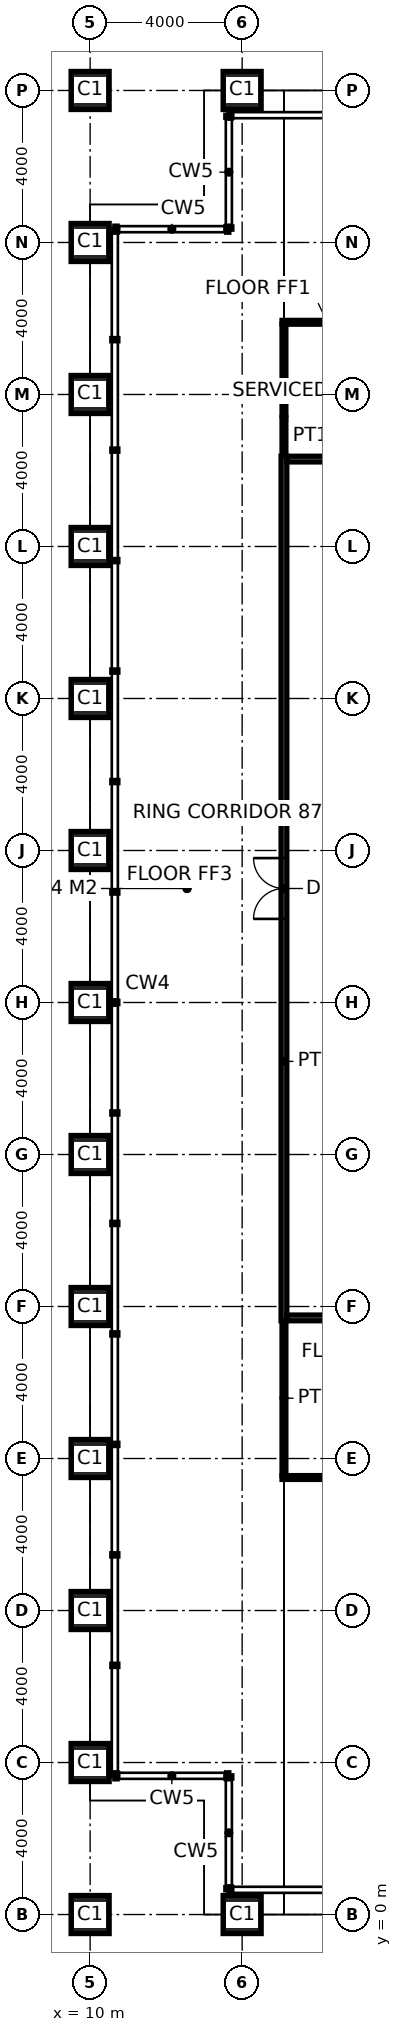
"""IFC4 building model, lengths in metres.
Left out: names, types, materials, properties, quantities, classifications, styles, units other than length and angle.
Written with IfcOpenShell. Run it as: python <this file> out.ifc"""

import sys

from ifc_helpers import new_model, si_unit, direction, frame, frame_2d, origin, origin_2d, place, context, subcontext, project, spatial, rectangle, hollow_rectangle, extrude, element, fill, save


model = new_model("IFC4")
c1 = context("Model", 3, precision=1e-05, world=origin(), true_north=direction((0.0, 1.0)))
c2 = subcontext(c1, "Body", "Model", "MODEL_VIEW")
j1 = project(units=[si_unit("LENGTHUNIT", "METRE"), si_unit("PLANEANGLEUNIT", "RADIAN")], contexts=[c1])
p1 = place(None, origin())
s1 = spatial("IfcSite", under=j1, at=p1, CompositionType="ELEMENT")
p2 = place(p1, origin())
s2 = spatial("IfcBuilding", under=s1, at=p2, CompositionType="ELEMENT")
p3 = place(p2, frame((0.0, 0.0, 76.4)))
s3 = spatial("IfcBuildingStorey", under=s2, at=p3, CompositionType="ELEMENT", Elevation=76.4)
for number, where, z_axis, x_axis in (
    (1, (10.0, 0.0, 0.0), (0.0, 0.0, 1.0), (1.0, 0.0, 0.0)),
    (2, (10.0, 4.0, 0.0), (0.0, 0.0, 1.0), (1.0, 0.0, 0.0)),
    (3, (10.0, 8.0, 0.0), (0.0, 0.0, 1.0), (1.0, 0.0, 0.0)),
    (4, (10.0, 12.0, 0.0), (0.0, 0.0, 1.0), (1.0, 0.0, 0.0)),
    (5, (10.0, 16.0, 0.0), (0.0, 0.0, 1.0), (1.0, 0.0, 0.0)),
    (6, (10.0, 20.0, 0.0), (0.0, 0.0, 1.0), (1.0, 0.0, 0.0)),
    (7, (10.0, 24.0, 0.0), (0.0, 0.0, 1.0), (1.0, 0.0, 0.0)),
    (8, (10.0, 28.0, 0.0), (0.0, 0.0, 1.0), (1.0, 0.0, 0.0)),
    (9, (10.0, 32.0, 0.0), (0.0, 0.0, 1.0), (1.0, 0.0, 0.0)),
    (10, (10.0, 36.0, 0.0), (0.0, 0.0, 1.0), (1.0, 0.0, 0.0)),
    (11, (10.0, 40.0, 0.0), (0.0, 0.0, 1.0), (1.0, 0.0, 0.0)),
    (12, (10.0, 44.0, 0.0), (0.0, 0.0, 1.0), (1.0, 0.0, 0.0)),
    (13, (10.0, 48.0, 0.0), (0.0, 0.0, 1.0), (1.0, 0.0, 0.0)),
    (14, (14.0, 0.0, 0.0), (0.0, 0.0, 1.0), (1.0, 0.0, 0.0)),
    (15, (14.0, 48.0, 0.0), (0.0, 0.0, 1.0), (1.0, 0.0, 0.0)),
):
    element("IfcColumn", number, at=place(p3, frame(where, z_axis=z_axis, x_axis=x_axis)), inside=s3, PredefinedType="COLUMN", context=c2, shape_type="SweptSolid", body=[
        extrude(hollow_rectangle(XDim=1.0, YDim=1.0, WallThickness=0.1, at=origin_2d()), origin(), (0.0, 0.0, 1.0), 5.0),
    ])
p4 = place(p3, frame((15.1, 15.625, 0.0), z_axis=(0.0, 0.0, 1.0), x_axis=(0.0, 1.0, 0.0)))
e16 = element("IfcWall", 16, at=p4, inside=s3, PredefinedType="PARTITIONING", context=c2, shape_type="SweptSolid", body=[
    extrude(rectangle(XDim=22.75, YDim=0.15, at=frame_2d((11.375, 0.0))), origin(), (0.0, 0.0, 1.0), 4.85),
])
p5 = place(p4, frame((10.575, 0.0, 0.0)))
e17 = element("IfcOpeningElement", 17, at=p5, cuts=e16, PredefinedType="OPENING", context=c2, shape_type="SweptSolid", body=[
    extrude(rectangle(XDim=1.6, YDim=2.7, at=frame_2d((0.8, 1.35))), frame((0.0, 0.085, 0.0), z_axis=(0.0, -1.0, 0.0), x_axis=(1.0, 0.0, 0.0)), (0.0, 0.0, 1.0), 0.17),
])
p6 = place(p3, frame((15.175, 15.7, 0.0), z_axis=(0.0, 0.0, 1.0), x_axis=(1.0, 0.0, 0.0)))
e18 = element("IfcWall", 18, at=p6, inside=s3, PredefinedType="PARTITIONING", context=c2, shape_type="SweptSolid", body=[
    extrude(rectangle(XDim=22.65, YDim=0.15, at=frame_2d((11.325, 0.0))), origin(), (0.0, 0.0, 1.0), 4.85),
])
p7 = place(p3, frame((15.175, 38.3, 0.0), z_axis=(0.0, 0.0, 1.0), x_axis=(1.0, 0.0, 0.0)))
e19 = element("IfcWall", 19, at=p7, inside=s3, PredefinedType="PARTITIONING", context=c2, shape_type="SweptSolid", body=[
    extrude(rectangle(XDim=22.65, YDim=0.15, at=frame_2d((11.325, 0.0))), origin(), (0.0, 0.0, 1.0), 4.85),
])
p8 = place(p7, frame((8.575, 0.0, 0.0)))
e20 = element("IfcOpeningElement", 20, at=p8, cuts=e19, PredefinedType="OPENING", context=c2, shape_type="SweptSolid", body=[
    extrude(rectangle(XDim=0.9, YDim=2.1, at=frame_2d((0.45, 1.05))), frame((0.0, 0.085, 0.0), z_axis=(0.0, -1.0, 0.0), x_axis=(1.0, 0.0, 0.0)), (0.0, 0.0, 1.0), 0.17),
])
p9 = place(p7, frame((12.325, 0.0, 0.0)))
e21 = element("IfcOpeningElement", 21, at=p9, cuts=e19, PredefinedType="OPENING", context=c2, shape_type="SweptSolid", body=[
    extrude(rectangle(XDim=1.0, YDim=2.1, at=frame_2d((0.5, 1.05))), frame((0.0, 0.085, 0.0), z_axis=(0.0, -1.0, 0.0), x_axis=(1.0, 0.0, 0.0)), (0.0, 0.0, 1.0), 0.17),
])
p10 = place(p7, frame((16.175, 0.0, 0.0)))
e22 = element("IfcOpeningElement", 22, at=p10, cuts=e19, PredefinedType="OPENING", context=c2, shape_type="SweptSolid", body=[
    extrude(rectangle(XDim=0.9, YDim=2.1, at=frame_2d((0.45, 1.05))), frame((0.0, 0.085, 0.0), z_axis=(0.0, -1.0, 0.0), x_axis=(1.0, 0.0, 0.0)), (0.0, 0.0, 1.0), 0.17),
])
p11 = place(p3, frame((15.05, 11.5, 0.0), z_axis=(0.0, 0.0, 1.0), x_axis=(1.0, 0.0, 0.0)))
e23 = element("IfcWall", 23, at=p11, inside=s3, PredefinedType="PARTITIONING", context=c2, shape_type="SweptSolid", body=[
    extrude(rectangle(XDim=9.85, YDim=0.1, at=frame_2d((4.925, 0.0))), origin(), (0.0, 0.0, 1.0), 4.85),
])
p12 = place(p11, frame((1.4, 0.0, 0.0)))
e24 = element("IfcOpeningElement", 24, at=p12, cuts=e23, PredefinedType="OPENING", context=c2, shape_type="SweptSolid", body=[
    extrude(rectangle(XDim=1.0, YDim=2.2, at=frame_2d((0.5, 1.1))), frame((0.0, 0.06, 0.0), z_axis=(0.0, -1.0, 0.0), x_axis=(1.0, 0.0, 0.0)), (0.0, 0.0, 1.0), 0.12),
])
p13 = place(p11, frame((4.95, 0.0, 0.0)))
e25 = element("IfcOpeningElement", 25, at=p13, cuts=e23, PredefinedType="OPENING", context=c2, shape_type="SweptSolid", body=[
    extrude(rectangle(XDim=1.0, YDim=2.2, at=frame_2d((0.5, 1.1))), frame((0.0, 0.06, 0.0), z_axis=(0.0, -1.0, 0.0), x_axis=(1.0, 0.0, 0.0)), (0.0, 0.0, 1.0), 0.12),
])
p14 = place(p11, frame((7.975, 0.0, 0.0)))
e26 = element("IfcOpeningElement", 26, at=p14, cuts=e23, PredefinedType="OPENING", context=c2, shape_type="SweptSolid", body=[
    extrude(rectangle(XDim=1.0, YDim=2.2, at=frame_2d((0.5, 1.1))), frame((0.0, 0.06, 0.0), z_axis=(0.0, -1.0, 0.0), x_axis=(1.0, 0.0, 0.0)), (0.0, 0.0, 1.0), 0.12),
])
p15 = place(p3, frame((15.05, 41.9, 0.0), z_axis=(0.0, 0.0, 1.0), x_axis=(1.0, 0.0, 0.0)))
e27 = element("IfcWall", 27, at=p15, inside=s3, PredefinedType="PARTITIONING", context=c2, shape_type="SweptSolid", body=[
    extrude(rectangle(XDim=6.9, YDim=0.1, at=frame_2d((3.45, 0.0))), origin(), (0.0, 0.0, 1.0), 4.85),
])
p16 = place(p15, frame((1.55, 0.0, 0.0)))
e28 = element("IfcOpeningElement", 28, at=p16, cuts=e27, PredefinedType="OPENING", context=c2, shape_type="SweptSolid", body=[
    extrude(rectangle(XDim=1.0, YDim=2.2, at=frame_2d((0.5, 1.1))), frame((0.0, 0.06, 0.0), z_axis=(0.0, -1.0, 0.0), x_axis=(1.0, 0.0, 0.0)), (0.0, 0.0, 1.0), 0.12),
])
p17 = place(p15, frame((5.0, 0.0, 0.0)))
e29 = element("IfcOpeningElement", 29, at=p17, cuts=e27, PredefinedType="OPENING", context=c2, shape_type="SweptSolid", body=[
    extrude(rectangle(XDim=1.0, YDim=2.2, at=frame_2d((0.5, 1.1))), frame((0.0, 0.06, 0.0), z_axis=(0.0, -1.0, 0.0), x_axis=(1.0, 0.0, 0.0)), (0.0, 0.0, 1.0), 0.12),
])
p18 = place(p3, frame((15.1, 11.55, 0.0), z_axis=(0.0, 0.0, 1.0), x_axis=(0.0, 1.0, 0.0)))
e30 = element("IfcWall", 30, at=p18, inside=s3, PredefinedType="PARTITIONING", context=c2, shape_type="SweptSolid", body=[
    extrude(rectangle(XDim=4.075, YDim=0.1, at=frame_2d((2.038, 0.0))), origin(), (0.0, 0.0, 1.0), 4.85),
])
p19 = place(p3, frame((15.1, 38.375, 0.0), z_axis=(0.0, 0.0, 1.0), x_axis=(0.0, 1.0, 0.0)))
e31 = element("IfcWall", 31, at=p19, inside=s3, PredefinedType="PARTITIONING", context=c2, shape_type="SweptSolid", body=[
    extrude(rectangle(XDim=3.475, YDim=0.1, at=frame_2d((1.738, 0.0))), origin(), (0.0, 0.0, 1.0), 4.85),
])
p20 = place(p5, origin())
e32 = element("IfcDoor", 32, at=p20, inside=s3, OperationType="DOUBLE_DOOR_DOUBLE_SWING", PredefinedType="DOOR", context=c2, shape_type="SweptSolid", body=[
    extrude(rectangle(XDim=1.6, YDim=2.7, at=frame_2d((0.8, 1.35))), frame((0.0, 0.025, 0.0), z_axis=(0.0, -1.0, 0.0), x_axis=(1.0, 0.0, 0.0)), (0.0, 0.0, 1.0), 0.05),
])
fill(e17, e32)
save(model, sys.argv[1])
